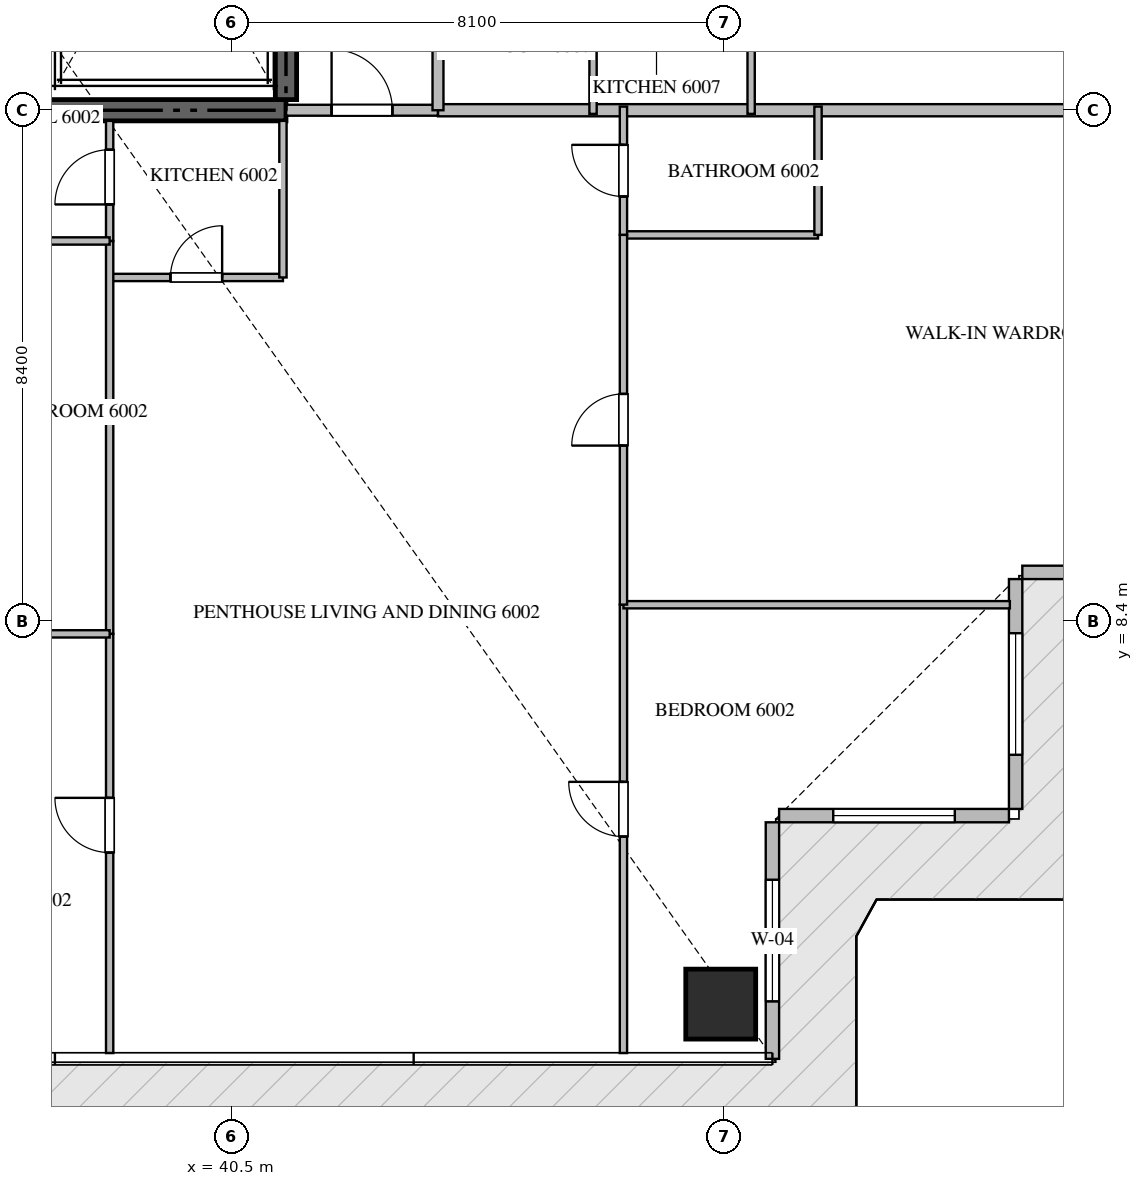
"""IFC4 building model, lengths in metres.
Left out: names, types, materials, properties, quantities, classifications, styles, units other than length and angle.
Written with IfcOpenShell. Run it as: python <this file> out.ifc"""

import sys

from ifc_helpers import new_model, si_unit, direction, frame, frame_2d, origin, origin_2d, place, context, subcontext, project, spatial, rectangle, extrude, source, transform, mapped, element, fill, save


model = new_model("IFC4")
c1 = context("Model", 3, precision=1e-05, world=origin(), true_north=direction((0.0, 1.0)))
c2 = subcontext(c1, "Body", "Model", "MODEL_VIEW")
j1 = project(units=[si_unit("LENGTHUNIT", "METRE"), si_unit("PLANEANGLEUNIT", "RADIAN")], contexts=[c1])
p1 = place(None, origin())
s1 = spatial("IfcSite", under=j1, at=p1, CompositionType="ELEMENT")
p2 = place(p1, origin())
s2 = spatial("IfcBuilding", under=s1, at=p2, CompositionType="ELEMENT")
p3 = place(p2, frame((0.0, 0.0, 241.25)))
s3 = spatial("IfcBuildingStorey", under=s2, at=p3, CompositionType="ELEMENT", Elevation=241.25)
p4 = place(p3, frame((23.4, 16.8, -0.26), z_axis=(0.0, 0.0, 1.0), x_axis=(1.0, 0.0, 0.0)))
e1 = element("IfcWall", 1, at=p4, inside=s3, PredefinedType="SHEAR", context=c2, shape_type="SweptSolid", body=[
    extrude(rectangle(XDim=18.0, YDim=0.35, at=frame_2d((9.0, 0.0))), origin(), (0.0, 0.0, 1.0), 3.848),
])
p5 = place(p3, frame((41.4, 16.975, -0.26), z_axis=(0.0, 0.0, 1.0), x_axis=(0.0, 1.0, 0.0)))
e2 = element("IfcWall", 2, at=p5, inside=s3, PredefinedType="SHEAR", context=c2, shape_type="SweptSolid", body=[
    extrude(rectangle(XDim=8.375, YDim=0.35, at=frame_2d((4.188, 0.0))), origin(), (0.0, 0.0, 1.0), 3.848),
])
m1 = source(origin(), c2, "Body", "SweptSolid", [
    extrude(rectangle(XDim=1.15, YDim=1.15, at=origin_2d()), origin(), (0.0, 0.0, 1.0), 3.85),
])
p6 = place(p3, frame((48.55, 2.1, -0.26), z_axis=(0.0, 0.0, 1.0), x_axis=(1.0, 0.0, 0.0)))
e3 = element("IfcColumn", 3, at=p6, inside=s3, PredefinedType="COLUMN", context=c2, shape_type="MappedRepresentation", body=[
    mapped(m1, transform((0.0, 0.0, 0.0), scale=1.0)),
])
p7 = place(p3, frame((49.4, 1.2, 0.0), z_axis=(0.0, 0.0, 1.0), x_axis=(0.0, 1.0, 0.0)))
e4 = element("IfcWall", 4, at=p7, inside=s3, PredefinedType="ELEMENTEDWALL", context=c2, shape_type="SweptSolid", body=[
    extrude(rectangle(XDim=3.89, YDim=0.22, at=frame_2d((1.945, 0.0))), origin(), (0.0, 0.0, 1.0), 3.575),
])
p8 = place(p7, frame((0.945, 0.0, 0.65)))
e5 = element("IfcOpeningElement", 5, at=p8, cuts=e4, PredefinedType="OPENING", context=c2, shape_type="SweptSolid", body=[
    extrude(rectangle(XDim=2.0, YDim=2.2, at=frame_2d((1.0, 1.1))), frame((0.0, 0.12, 0.0), z_axis=(0.0, -1.0, 0.0), x_axis=(1.0, 0.0, 0.0)), (0.0, 0.0, 1.0), 0.24),
])
p9 = place(p3, frame((49.51, 5.2, 0.0), z_axis=(0.0, 0.0, 1.0), x_axis=(1.0, 0.0, 0.0)))
e6 = element("IfcWall", 6, at=p9, inside=s3, PredefinedType="ELEMENTEDWALL", context=c2, shape_type="SweptSolid", body=[
    extrude(rectangle(XDim=3.78, YDim=0.22, at=frame_2d((1.89, 0.0))), origin(), (0.0, 0.0, 1.0), 3.575),
])
p10 = place(p9, frame((0.89, 0.0, 0.65)))
e7 = element("IfcOpeningElement", 7, at=p10, cuts=e6, PredefinedType="OPENING", context=c2, shape_type="SweptSolid", body=[
    extrude(rectangle(XDim=2.0, YDim=2.2, at=frame_2d((1.0, 1.1))), frame((0.0, 0.12, 0.0), z_axis=(0.0, -1.0, 0.0), x_axis=(1.0, 0.0, 0.0)), (0.0, 0.0, 1.0), 0.24),
])
p11 = place(p3, frame((53.4, 5.31, 0.0), z_axis=(0.0, 0.0, 1.0), x_axis=(0.0, 1.0, 0.0)))
e8 = element("IfcWall", 8, at=p11, inside=s3, PredefinedType="ELEMENTEDWALL", context=c2, shape_type="SweptSolid", body=[
    extrude(rectangle(XDim=3.78, YDim=0.22, at=frame_2d((1.89, 0.0))), origin(), (0.0, 0.0, 1.0), 3.575),
])
p12 = place(p11, frame((0.89, 0.0, 0.65)))
e9 = element("IfcOpeningElement", 9, at=p12, cuts=e8, PredefinedType="OPENING", context=c2, shape_type="SweptSolid", body=[
    extrude(rectangle(XDim=2.0, YDim=2.2, at=frame_2d((1.0, 1.1))), frame((0.0, 0.12, 0.0), z_axis=(0.0, -1.0, 0.0), x_axis=(1.0, 0.0, 0.0)), (0.0, 0.0, 1.0), 0.24),
])
p13 = place(p3, frame((53.51, 9.2, 0.0), z_axis=(0.0, 0.0, 1.0), x_axis=(1.0, 0.0, 0.0)))
e10 = element("IfcWall", 10, at=p13, inside=s3, PredefinedType="ELEMENTEDWALL", context=c2, shape_type="SweptSolid", body=[
    extrude(rectangle(XDim=3.89, YDim=0.22, at=frame_2d((1.945, 0.0))), origin(), (0.0, 0.0, 1.0), 3.575),
])
p14 = place(p13, frame((0.945, 0.0, 0.65)))
e11 = element("IfcOpeningElement", 11, at=p14, cuts=e10, PredefinedType="OPENING", context=c2, shape_type="SweptSolid", body=[
    extrude(rectangle(XDim=2.0, YDim=2.2, at=frame_2d((1.0, 1.1))), frame((0.0, 0.12, 0.0), z_axis=(0.0, -1.0, 0.0), x_axis=(1.0, 0.0, 0.0)), (0.0, 0.0, 1.0), 0.24),
])
p15 = place(p3, frame((43.9, 16.8, 0.0), z_axis=(0.0, 0.0, 1.0), x_axis=(1.0, 0.0, 0.0)))
e12 = element("IfcWall", 12, at=p15, inside=s3, PredefinedType="PARTITIONING", context=c2, shape_type="SweptSolid", body=[
    extrude(rectangle(XDim=13.418, YDim=0.2, at=frame_2d((6.709, 0.0))), origin(), (0.0, 0.0, 1.0), 3.59),
])
p16 = place(p3, frame((41.402, 16.8, 0.0), z_axis=(0.0, 0.0, 1.0), x_axis=(1.0, 0.0, 0.0)))
e13 = element("IfcWall", 13, at=p16, inside=s3, PredefinedType="PARTITIONING", context=c2, shape_type="SweptSolid", body=[
    extrude(rectangle(XDim=2.496, YDim=0.18, at=frame_2d((1.248, 0.0))), origin(), (0.0, 0.0, 1.0), 3.59),
])
p17 = place(p16, frame((0.748, 0.0, 0.0)))
e14 = element("IfcOpeningElement", 14, at=p17, cuts=e13, PredefinedType="OPENING", context=c2, shape_type="SweptSolid", body=[
    extrude(rectangle(XDim=1.0, YDim=2.15, at=frame_2d((0.5, 1.075))), frame((0.0, 0.1, 0.0), z_axis=(0.0, -1.0, 0.0), x_axis=(1.0, 0.0, 0.0)), (0.0, 0.0, 1.0), 0.2),
])
p18 = place(p3, frame((43.9, 16.8, 0.0), z_axis=(0.0, 0.0, 1.0), x_axis=(0.0, 1.0, 0.0)))
e15 = element("IfcWall", 15, at=p18, inside=s3, PredefinedType="PARTITIONING", context=c2, shape_type="SweptSolid", body=[
    extrude(rectangle(XDim=16.8, YDim=0.18, at=frame_2d((8.4, 0.0))), origin(), (0.0, 0.0, 1.0), 3.59),
])
p19 = place(p18, frame((4.993, 0.0, 0.0)))
e16 = element("IfcOpeningElement", 16, at=p19, cuts=e15, PredefinedType="OPENING", context=c2, shape_type="SweptSolid", body=[
    extrude(rectangle(XDim=1.0, YDim=2.15, at=frame_2d((0.5, 1.075))), frame((0.0, 0.1, 0.0), z_axis=(0.0, -1.0, 0.0), x_axis=(1.0, 0.0, 0.0)), (0.0, 0.0, 1.0), 0.2),
])
p20 = place(p18, frame((13.351, 0.0, 0.0)))
e17 = element("IfcOpeningElement", 17, at=p20, cuts=e15, PredefinedType="OPENING", context=c2, shape_type="SweptSolid", body=[
    extrude(rectangle(XDim=1.0, YDim=2.15, at=frame_2d((0.5, 1.075))), frame((0.0, 0.1, 0.0), z_axis=(0.0, -1.0, 0.0), x_axis=(1.0, 0.0, 0.0)), (0.0, 0.0, 1.0), 0.2),
])
p21 = place(p3, frame((38.5, 14.05, 0.0), z_axis=(0.0, 0.0, 1.0), x_axis=(1.0, 0.0, 0.0)))
e18 = element("IfcWall", 18, at=p21, inside=s3, PredefinedType="PARTITIONING", context=c2, shape_type="SweptSolid", body=[
    extrude(rectangle(XDim=2.85, YDim=0.12, at=frame_2d((1.425, 0.0))), origin(), (0.0, 0.0, 1.0), 3.59),
])
p22 = place(p21, frame((1.0, 0.0, 0.0)))
e19 = element("IfcOpeningElement", 19, at=p22, cuts=e18, PredefinedType="OPENING", context=c2, shape_type="SweptSolid", body=[
    extrude(rectangle(XDim=0.85, YDim=2.1, at=frame_2d((0.425, 1.05))), frame((0.0, 0.07, 0.0), z_axis=(0.0, -1.0, 0.0), x_axis=(1.0, 0.0, 0.0)), (0.0, 0.0, 1.0), 0.14),
])
p23 = place(p3, frame((41.35, 14.05, 0.0), z_axis=(0.0, 0.0, 1.0), x_axis=(0.0, 1.0, 0.0)))
e20 = element("IfcWall", 20, at=p23, inside=s3, PredefinedType="PARTITIONING", context=c2, shape_type="SweptSolid", body=[
    extrude(rectangle(XDim=2.575, YDim=0.12, at=frame_2d((1.288, 0.0))), origin(), (0.0, 0.0, 1.0), 3.59),
])
p24 = place(p3, frame((38.5, 14.65, 0.0), z_axis=(0.0, 0.0, 1.0), x_axis=(0.0, 1.0, 0.0)))
e21 = element("IfcWall", 21, at=p24, inside=s3, PredefinedType="PARTITIONING", context=c2, shape_type="SweptSolid", body=[
    extrude(rectangle(XDim=1.975, YDim=0.12, at=frame_2d((0.988, 0.0))), origin(), (0.0, 0.0, 1.0), 3.59),
])
p25 = place(p24, frame((0.601, 0.0, 0.0)))
e22 = element("IfcOpeningElement", 22, at=p25, cuts=e21, PredefinedType="OPENING", context=c2, shape_type="SweptSolid", body=[
    extrude(rectangle(XDim=0.9, YDim=2.1, at=frame_2d((0.45, 1.05))), frame((0.0, 0.07, 0.0), z_axis=(0.0, -1.0, 0.0), x_axis=(1.0, 0.0, 0.0)), (0.0, 0.0, 1.0), 0.14),
])
p26 = place(p3, frame((38.5, 1.295, 0.0), z_axis=(0.0, 0.0, 1.0), x_axis=(0.0, 1.0, 0.0)))
e23 = element("IfcWall", 23, at=p26, inside=s3, PredefinedType="PARTITIONING", context=c2, shape_type="SweptSolid", body=[
    extrude(rectangle(XDim=6.894, YDim=0.12, at=frame_2d((3.447, 0.0))), origin(), (0.0, 0.0, 1.0), 3.59),
])
p27 = place(p26, frame((3.297, 0.0, 0.0)))
e24 = element("IfcOpeningElement", 24, at=p27, cuts=e23, PredefinedType="OPENING", context=c2, shape_type="SweptSolid", body=[
    extrude(rectangle(XDim=0.9, YDim=2.1, at=frame_2d((0.45, 1.05))), frame((0.0, 0.07, 0.0), z_axis=(0.0, -1.0, 0.0), x_axis=(1.0, 0.0, 0.0)), (0.0, 0.0, 1.0), 0.14),
])
p28 = place(p3, frame((38.5, 8.191, 0.0), z_axis=(0.0, 0.0, 1.0), x_axis=(0.0, 1.0, 0.0)))
e25 = element("IfcWall", 25, at=p28, inside=s3, PredefinedType="PARTITIONING", context=c2, shape_type="SweptSolid", body=[
    extrude(rectangle(XDim=6.457, YDim=0.12, at=frame_2d((3.229, 0.0))), origin(), (0.0, 0.0, 1.0), 3.59),
])
p29 = place(p3, frame((33.38, 8.189, 0.0), z_axis=(0.0, 0.0, 1.0), x_axis=(1.0, 0.0, 0.0)))
e26 = element("IfcWall", 26, at=p29, inside=s3, PredefinedType="PARTITIONING", context=c2, shape_type="SweptSolid", body=[
    extrude(rectangle(XDim=5.12, YDim=0.12, at=frame_2d((2.56, 0.0))), origin(), (0.0, 0.0, 1.0), 3.59),
])
p30 = place(p3, frame((35.482, 14.65, 0.0), z_axis=(0.0, 0.0, 1.0), x_axis=(1.0, 0.0, 0.0)))
e27 = element("IfcWall", 27, at=p30, inside=s3, PredefinedType="PARTITIONING", context=c2, shape_type="SweptSolid", body=[
    extrude(rectangle(XDim=3.018, YDim=0.12, at=frame_2d((1.509, 0.0))), origin(), (0.0, 0.0, 1.0), 3.59),
])
p31 = place(p30, frame((1.084, 0.0, 0.0)))
e28 = element("IfcOpeningElement", 28, at=p31, cuts=e27, PredefinedType="OPENING", context=c2, shape_type="SweptSolid", body=[
    extrude(rectangle(XDim=0.85, YDim=2.1, at=frame_2d((0.425, 1.05))), frame((0.0, 0.07, 0.0), z_axis=(0.0, -1.0, 0.0), x_axis=(1.0, 0.0, 0.0)), (0.0, 0.0, 1.0), 0.14),
])
p32 = place(p3, frame((46.95, 1.295, 0.0), z_axis=(0.0, 0.0, 1.0), x_axis=(0.0, 1.0, 0.0)))
e29 = element("IfcWall", 29, at=p32, inside=s3, PredefinedType="PARTITIONING", context=c2, shape_type="SweptSolid", body=[
    extrude(rectangle(XDim=7.373, YDim=0.12, at=frame_2d((3.687, 0.0))), origin(), (0.0, 0.0, 1.0), 3.59),
])
p33 = place(p32, frame((3.56, 0.0, 0.0)))
e30 = element("IfcOpeningElement", 30, at=p33, cuts=e29, PredefinedType="OPENING", context=c2, shape_type="SweptSolid", body=[
    extrude(rectangle(XDim=0.9, YDim=2.1, at=frame_2d((0.45, 1.05))), frame((0.0, 0.07, 0.0), z_axis=(0.0, -1.0, 0.0), x_axis=(1.0, 0.0, 0.0)), (0.0, 0.0, 1.0), 0.14),
])
p34 = place(p3, frame((46.95, 8.668, 0.0), z_axis=(0.0, 0.0, 1.0), x_axis=(1.0, 0.0, 0.0)))
e31 = element("IfcWall", 31, at=p34, inside=s3, PredefinedType="PARTITIONING", context=c2, shape_type="SweptSolid", body=[
    extrude(rectangle(XDim=6.355, YDim=0.12, at=frame_2d((3.177, 0.0))), origin(), (0.0, 0.0, 1.0), 3.59),
])
p35 = place(p3, frame((46.95, 14.75, 0.0), z_axis=(0.0, 0.0, 1.0), x_axis=(1.0, 0.0, 0.0)))
e32 = element("IfcWall", 32, at=p35, inside=s3, PredefinedType="PARTITIONING", context=c2, shape_type="SweptSolid", body=[
    extrude(rectangle(XDim=3.2, YDim=0.12, at=frame_2d((1.6, 0.0))), origin(), (0.0, 0.0, 1.0), 3.59),
])
p36 = place(p3, frame((50.15, 14.75, 0.0), z_axis=(0.0, 0.0, 1.0), x_axis=(0.0, 1.0, 0.0)))
e33 = element("IfcWall", 33, at=p36, inside=s3, PredefinedType="PARTITIONING", context=c2, shape_type="SweptSolid", body=[
    extrude(rectangle(XDim=2.11, YDim=0.12, at=frame_2d((1.055, 0.0))), origin(), (0.0, 0.0, 1.0), 3.59),
])
p37 = place(p3, frame((46.95, 8.67, 0.0), z_axis=(0.0, 0.0, 1.0), x_axis=(0.0, 1.0, 0.0)))
e34 = element("IfcWall", 34, at=p37, inside=s3, PredefinedType="PARTITIONING", context=c2, shape_type="SweptSolid", body=[
    extrude(rectangle(XDim=6.08, YDim=0.12, at=frame_2d((3.04, 0.0))), origin(), (0.0, 0.0, 1.0), 3.59),
])
p38 = place(p37, frame((2.615, 0.0, 0.0)))
e35 = element("IfcOpeningElement", 35, at=p38, cuts=e34, PredefinedType="OPENING", context=c2, shape_type="SweptSolid", body=[
    extrude(rectangle(XDim=0.85, YDim=2.1, at=frame_2d((0.425, 1.05))), frame((0.0, 0.07, 0.0), z_axis=(0.0, -1.0, 0.0), x_axis=(1.0, 0.0, 0.0)), (0.0, 0.0, 1.0), 0.14),
])
p39 = place(p3, frame((46.95, 14.752, 0.0), z_axis=(0.0, 0.0, 1.0), x_axis=(0.0, 1.0, 0.0)))
e36 = element("IfcWall", 36, at=p39, inside=s3, PredefinedType="PARTITIONING", context=c2, shape_type="SweptSolid", body=[
    extrude(rectangle(XDim=2.108, YDim=0.12, at=frame_2d((1.054, 0.0))), origin(), (0.0, 0.0, 1.0), 3.59),
])
p40 = place(p39, frame((0.629, 0.0, 0.0)))
e37 = element("IfcOpeningElement", 37, at=p40, cuts=e36, PredefinedType="OPENING", context=c2, shape_type="SweptSolid", body=[
    extrude(rectangle(XDim=0.85, YDim=2.1, at=frame_2d((0.425, 1.05))), frame((0.0, 0.07, 0.0), z_axis=(0.0, -1.0, 0.0), x_axis=(1.0, 0.0, 0.0)), (0.0, 0.0, 1.0), 0.14),
])
for number, where, z_axis, x_axis in (
    (38, (46.45, 16.74, 0.0), (0.0, 0.0, 1.0), (0.0, 1.0, 0.0)),
    (39, (49.05, 16.74, 0.0), (0.0, 0.0, 1.0), (0.0, 1.0, 0.0)),
):
    element("IfcWall", number, at=place(p3, frame(where, z_axis=z_axis, x_axis=x_axis)), inside=s3, PredefinedType="PARTITIONING", context=c2, shape_type="SweptSolid", body=[
        extrude(rectangle(XDim=2.66, YDim=0.12, at=frame_2d((1.33, 0.0))), origin(), (0.0, 0.0, 1.0), 3.59),
    ])
m2 = source(origin(), c2, "Body", "SweptSolid", [
    extrude(rectangle(XDim=2.0, YDim=2.2, at=frame_2d((1.0, 1.1))), frame((0.0, 0.03, 0.0), z_axis=(0.0, -1.0, 0.0), x_axis=(1.0, 0.0, 0.0)), (0.0, 0.0, 1.0), 0.06),
])
p41 = place(p8, origin())
e40 = element("IfcWindow", 40, at=p41, inside=s3, PartitioningType="SINGLE_PANEL", PredefinedType="WINDOW", context=c2, shape_type="MappedRepresentation", body=[
    mapped(m2, transform((0.0, 0.0, 0.0), scale=1.0)),
])
fill(e5, e40)
p42 = place(p10, origin())
e41 = element("IfcWindow", 41, at=p42, inside=s3, PartitioningType="SINGLE_PANEL", PredefinedType="WINDOW", context=c2, shape_type="MappedRepresentation", body=[
    mapped(m2, transform((0.0, 0.0, 0.0), scale=1.0)),
])
fill(e7, e41)
p43 = place(p12, origin())
e42 = element("IfcWindow", 42, at=p43, inside=s3, PartitioningType="SINGLE_PANEL", PredefinedType="WINDOW", context=c2, shape_type="MappedRepresentation", body=[
    mapped(m2, transform((0.0, 0.0, 0.0), scale=1.0)),
])
fill(e9, e42)
m3 = source(origin(), c2, "Body", "SweptSolid", [
    extrude(rectangle(XDim=1.0, YDim=2.15, at=frame_2d((0.5, 1.075))), frame((0.0, 0.025, 0.0), z_axis=(0.0, -1.0, 0.0), x_axis=(1.0, 0.0, 0.0)), (0.0, 0.0, 1.0), 0.05),
])
p44 = place(p17, origin())
e43 = element("IfcDoor", 43, at=p44, inside=s3, OperationType="SINGLE_SWING_LEFT", PredefinedType="DOOR", context=c2, shape_type="MappedRepresentation", body=[
    mapped(m3, transform((0.0, 0.0, 0.0), scale=1.0)),
])
fill(e14, e43)
m4 = source(origin(), c2, "Body", "SweptSolid", [
    extrude(rectangle(XDim=0.85, YDim=2.1, at=frame_2d((0.425, 1.05))), frame((0.0, 0.025, 0.0), z_axis=(0.0, -1.0, 0.0), x_axis=(1.0, 0.0, 0.0)), (0.0, 0.0, 1.0), 0.05),
])
p45 = place(p22, origin())
e44 = element("IfcDoor", 44, at=p45, inside=s3, OperationType="SINGLE_SWING_RIGHT", PredefinedType="DOOR", context=c2, shape_type="MappedRepresentation", body=[
    mapped(m4, transform((0.0, 0.0, 0.0), scale=1.0)),
])
fill(e19, e44)
m5 = source(origin(), c2, "Body", "SweptSolid", [
    extrude(rectangle(XDim=0.9, YDim=2.1, at=frame_2d((0.45, 1.05))), frame((0.0, 0.025, 0.0), z_axis=(0.0, -1.0, 0.0), x_axis=(1.0, 0.0, 0.0)), (0.0, 0.0, 1.0), 0.05),
])
p46 = place(p25, origin())
e45 = element("IfcDoor", 45, at=p46, inside=s3, OperationType="SINGLE_SWING_LEFT", PredefinedType="DOOR", context=c2, shape_type="MappedRepresentation", body=[
    mapped(m5, transform((0.0, 0.0, 0.0), scale=1.0)),
])
fill(e22, e45)
p47 = place(p27, origin())
e46 = element("IfcDoor", 46, at=p47, inside=s3, OperationType="SINGLE_SWING_RIGHT", PredefinedType="DOOR", context=c2, shape_type="MappedRepresentation", body=[
    mapped(m5, transform((0.0, 0.0, 0.0), scale=1.0)),
])
fill(e24, e46)
p48 = place(p33, origin())
e47 = element("IfcDoor", 47, at=p48, inside=s3, OperationType="SINGLE_SWING_RIGHT", PredefinedType="DOOR", context=c2, shape_type="MappedRepresentation", body=[
    mapped(m5, transform((0.0, 0.0, 0.0), scale=1.0)),
])
fill(e30, e47)
p49 = place(p38, origin())
e48 = element("IfcDoor", 48, at=p49, inside=s3, OperationType="SINGLE_SWING_LEFT", PredefinedType="DOOR", context=c2, shape_type="MappedRepresentation", body=[
    mapped(m4, transform((0.0, 0.0, 0.0), scale=1.0)),
])
fill(e35, e48)
p50 = place(p40, origin())
e49 = element("IfcDoor", 49, at=p50, inside=s3, OperationType="SINGLE_SWING_RIGHT", PredefinedType="DOOR", context=c2, shape_type="MappedRepresentation", body=[
    mapped(m4, transform((0.0, 0.0, 0.0), scale=1.0)),
])
fill(e37, e49)
save(model, sys.argv[1])
